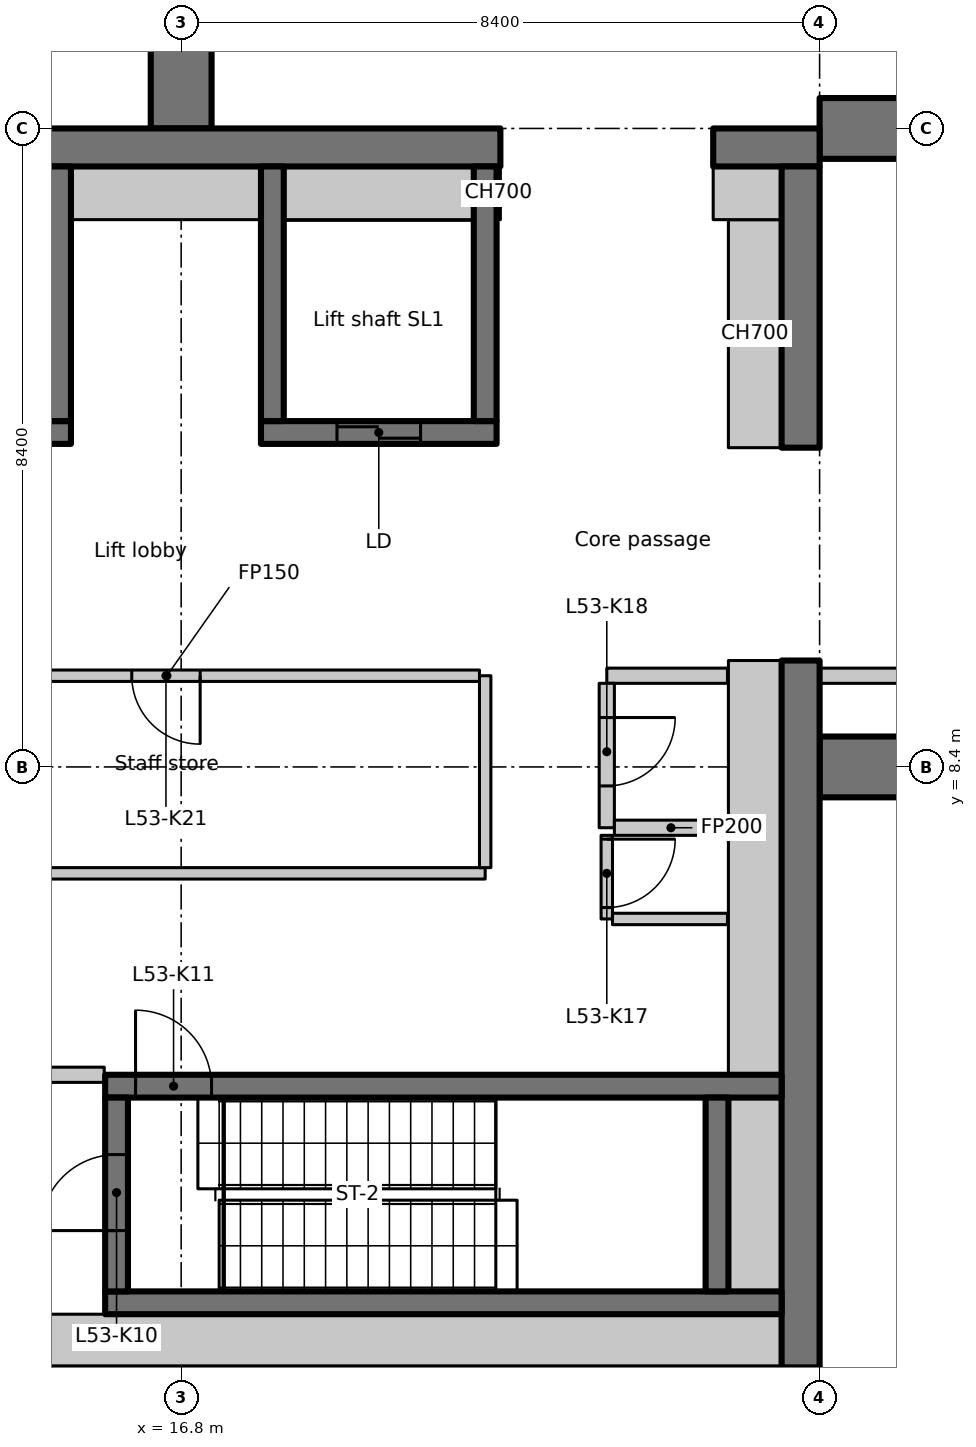
"""IFC4 building model, lengths in metres.
Left out: names, types, materials, properties, quantities, classifications, styles, units other than length and angle.
Written with IfcOpenShell. Run it as: python <this file> out.ifc"""

import sys

from ifc_helpers import new_model, si_unit, direction, frame, frame_2d, origin, place, context, subcontext, project, spatial, rectangle, extrude, element, fill, save


model = new_model("IFC4")
c1 = context("Model", 3, precision=1e-05, world=origin(), true_north=direction((0.0, 1.0)))
c2 = subcontext(c1, "Body", "Model", "MODEL_VIEW")
j1 = project(units=[si_unit("LENGTHUNIT", "METRE"), si_unit("PLANEANGLEUNIT", "RADIAN")], contexts=[c1])
p1 = place(None, origin())
s1 = spatial("IfcSite", under=j1, at=p1, CompositionType="ELEMENT")
p2 = place(p1, origin())
s2 = spatial("IfcBuilding", under=s1, at=p2, CompositionType="ELEMENT")
p3 = place(p2, frame((0.0, 0.0, 210.9)))
s3 = spatial("IfcBuildingStorey", under=s2, at=p3, CompositionType="ELEMENT", Elevation=210.9)
for number, where, z_axis, x_axis in (
    (1, (25.2, 8.4, 0.0), (0.0, 0.0, 1.0), (1.0, 0.0, 0.0)),
    (2, (25.2, 16.8, 0.0), (0.0, 0.0, 1.0), (1.0, 0.0, 0.0)),
    (3, (16.8, 16.8, 0.0), (0.0, 0.0, 1.0), (0.0, 1.0, 0.0)),
):
    element("IfcWall", number, at=place(p3, frame(where, z_axis=z_axis, x_axis=x_axis)), inside=s3, PredefinedType="SHEAR", context=c2, shape_type="SweptSolid", body=[
        extrude(rectangle(XDim=3.115, YDim=0.8, at=frame_2d((1.558, 0.0))), origin(), (0.0, 0.0, 1.0), 4.55),
    ])
p4 = place(p3, frame((-1.1, 16.55, 0.0), z_axis=(0.0, 0.0, 1.0), x_axis=(1.0, 0.0, 0.0)))
e4 = element("IfcWall", 4, at=p4, inside=s3, PredefinedType="SHEAR", context=c2, shape_type="SweptSolid", body=[
    extrude(rectangle(XDim=22.1, YDim=0.5, at=frame_2d((11.05, 0.0))), origin(), (0.0, 0.0, 1.0), 4.55),
])
p5 = place(p4, frame((3.15, 0.0, 0.0)))
e5 = element("IfcOpeningElement", 5, at=p5, cuts=e4, PredefinedType="OPENING", context=c2, shape_type="SweptSolid", body=[
    extrude(rectangle(XDim=1.1, YDim=2.3, at=frame_2d((0.55, 1.15))), frame((0.0, 0.26, 0.0), z_axis=(0.0, -1.0, 0.0), x_axis=(1.0, 0.0, 0.0)), (0.0, 0.0, 1.0), 0.52),
])
p6 = place(p3, frame((23.8, 16.55, 0.0), z_axis=(0.0, 0.0, 1.0), x_axis=(1.0, 0.0, 0.0)))
e6 = element("IfcWall", 6, at=p6, inside=s3, PredefinedType="SHEAR", context=c2, shape_type="SweptSolid", body=[
    extrude(rectangle(XDim=1.4, YDim=0.5, at=frame_2d((0.7, 0.0))), origin(), (0.0, 0.0, 1.0), 4.55),
])
p7 = place(p3, frame((24.95, 0.5, 0.0), z_axis=(0.0, 0.0, 1.0), x_axis=(0.0, 1.0, 0.0)))
e7 = element("IfcWall", 7, at=p7, inside=s3, PredefinedType="SHEAR", context=c2, shape_type="SweptSolid", body=[
    extrude(rectangle(XDim=9.3, YDim=0.5, at=frame_2d((4.65, 0.0))), origin(), (0.0, 0.0, 1.0), 4.55),
])
p8 = place(p3, frame((24.95, 12.6, 0.0), z_axis=(0.0, 0.0, 1.0), x_axis=(0.0, 1.0, 0.0)))
e8 = element("IfcWall", 8, at=p8, inside=s3, PredefinedType="SHEAR", context=c2, shape_type="SweptSolid", body=[
    extrude(rectangle(XDim=3.7, YDim=0.5, at=frame_2d((1.85, 0.0))), origin(), (0.0, 0.0, 1.0), 4.55),
])
p9 = place(p3, frame((24.35, 12.6, 0.0), z_axis=(0.0, 0.0, 1.0), x_axis=(0.0, 1.0, 0.0)))
e9 = element("IfcWall", 9, at=p9, inside=s3, PredefinedType="PARTITIONING", context=c2, shape_type="SweptSolid", body=[
    extrude(rectangle(XDim=3.0, YDim=0.7, at=frame_2d((1.5, 0.0))), origin(), (0.0, 0.0, 1.0), 4.55),
])
p10 = place(p3, frame((23.8, 15.95, 0.0), z_axis=(0.0, 0.0, 1.0), x_axis=(1.0, 0.0, 0.0)))
e10 = element("IfcWall", 10, at=p10, inside=s3, PredefinedType="PARTITIONING", context=c2, shape_type="SweptSolid", body=[
    extrude(rectangle(XDim=0.9, YDim=0.7, at=frame_2d((0.45, 0.0))), origin(), (0.0, 0.0, 1.0), 4.55),
])
p11 = place(p3, frame((0.5, 12.8, 0.0), z_axis=(0.0, 0.0, 1.0), x_axis=(1.0, 0.0, 0.0)))
e11 = element("IfcWall", 11, at=p11, inside=s3, PredefinedType="SHEAR", context=c2, shape_type="SweptSolid", body=[
    extrude(rectangle(XDim=14.85, YDim=0.3, at=frame_2d((7.425, 0.0))), origin(), (0.0, 0.0, 1.0), 4.55),
])
p12 = place(p11, frame((4.35, 0.0, 0.0)))
e12 = element("IfcOpeningElement", 12, at=p12, cuts=e11, PredefinedType="OPENING", context=c2, shape_type="SweptSolid", body=[
    extrude(rectangle(XDim=1.1, YDim=2.3, at=frame_2d((0.55, 1.15))), frame((0.0, 0.16, 0.0), z_axis=(0.0, -1.0, 0.0), x_axis=(1.0, 0.0, 0.0)), (0.0, 0.0, 1.0), 0.32),
])
p13 = place(p11, frame((7.15, 0.0, 0.0)))
e13 = element("IfcOpeningElement", 13, at=p13, cuts=e11, PredefinedType="OPENING", context=c2, shape_type="SweptSolid", body=[
    extrude(rectangle(XDim=1.1, YDim=2.3, at=frame_2d((0.55, 1.15))), frame((0.0, 0.16, 0.0), z_axis=(0.0, -1.0, 0.0), x_axis=(1.0, 0.0, 0.0)), (0.0, 0.0, 1.0), 0.32),
])
p14 = place(p11, frame((9.95, 0.0, 0.0)))
e14 = element("IfcOpeningElement", 14, at=p14, cuts=e11, PredefinedType="OPENING", context=c2, shape_type="SweptSolid", body=[
    extrude(rectangle(XDim=1.1, YDim=2.3, at=frame_2d((0.55, 1.15))), frame((0.0, 0.16, 0.0), z_axis=(0.0, -1.0, 0.0), x_axis=(1.0, 0.0, 0.0)), (0.0, 0.0, 1.0), 0.32),
])
p15 = place(p11, frame((12.75, 0.0, 0.0)))
e15 = element("IfcOpeningElement", 15, at=p15, cuts=e11, PredefinedType="OPENING", context=c2, shape_type="SweptSolid", body=[
    extrude(rectangle(XDim=1.1, YDim=2.3, at=frame_2d((0.55, 1.15))), frame((0.0, 0.16, 0.0), z_axis=(0.0, -1.0, 0.0), x_axis=(1.0, 0.0, 0.0)), (0.0, 0.0, 1.0), 0.32),
])
p16 = place(p3, frame((15.2, 12.95, 0.0), z_axis=(0.0, 0.0, 1.0), x_axis=(0.0, 1.0, 0.0)))
e16 = element("IfcWall", 16, at=p16, inside=s3, PredefinedType="SHEAR", context=c2, shape_type="SweptSolid", body=[
    extrude(rectangle(XDim=3.35, YDim=0.3, at=frame_2d((1.675, 0.0))), origin(), (0.0, 0.0, 1.0), 4.55),
])
p17 = place(p3, frame((17.85, 12.8, 0.0), z_axis=(0.0, 0.0, 1.0), x_axis=(1.0, 0.0, 0.0)))
e17 = element("IfcWall", 17, at=p17, inside=s3, PredefinedType="SHEAR", context=c2, shape_type="SweptSolid", body=[
    extrude(rectangle(XDim=3.1, YDim=0.3, at=frame_2d((1.55, 0.0))), origin(), (0.0, 0.0, 1.0), 4.55),
])
p18 = place(p17, frame((1.0, 0.0, 0.0)))
e18 = element("IfcOpeningElement", 18, at=p18, cuts=e17, PredefinedType="OPENING", context=c2, shape_type="SweptSolid", body=[
    extrude(rectangle(XDim=1.1, YDim=2.3, at=frame_2d((0.55, 1.15))), frame((0.0, 0.16, 0.0), z_axis=(0.0, -1.0, 0.0), x_axis=(1.0, 0.0, 0.0)), (0.0, 0.0, 1.0), 0.32),
])
for number, where, z_axis, x_axis in (
    (19, (18.0, 12.95, 0.0), (0.0, 0.0, 1.0), (0.0, 1.0, 0.0)),
    (20, (20.8, 12.95, 0.0), (0.0, 0.0, 1.0), (0.0, 1.0, 0.0)),
):
    element("IfcWall", number, at=place(p3, frame(where, z_axis=z_axis, x_axis=x_axis)), inside=s3, PredefinedType="SHEAR", context=c2, shape_type="SweptSolid", body=[
        extrude(rectangle(XDim=3.35, YDim=0.3, at=frame_2d((1.675, 0.0))), origin(), (0.0, 0.0, 1.0), 4.55),
    ])
p19 = place(p3, frame((15.8, 1.35, 0.0), z_axis=(0.0, 0.0, 1.0), x_axis=(1.0, 0.0, 0.0)))
e21 = element("IfcWall", 21, at=p19, inside=s3, PredefinedType="SHEAR", context=c2, shape_type="SweptSolid", body=[
    extrude(rectangle(XDim=8.9, YDim=0.3, at=frame_2d((4.45, 0.0))), origin(), (0.0, 0.0, 1.0), 4.55),
])
p20 = place(p3, frame((15.8, 4.2, 0.0), z_axis=(0.0, 0.0, 1.0), x_axis=(1.0, 0.0, 0.0)))
e22 = element("IfcWall", 22, at=p20, inside=s3, PredefinedType="SHEAR", context=c2, shape_type="SweptSolid", body=[
    extrude(rectangle(XDim=8.9, YDim=0.3, at=frame_2d((4.45, 0.0))), origin(), (0.0, 0.0, 1.0), 4.55),
])
p21 = place(p20, frame((0.4, 0.0, 0.0)))
e23 = element("IfcOpeningElement", 23, at=p21, cuts=e22, PredefinedType="OPENING", context=c2, shape_type="SweptSolid", body=[
    extrude(rectangle(XDim=1.0, YDim=2.1, at=frame_2d((0.5, 1.05))), frame((0.0, 0.16, 0.0), z_axis=(0.0, -1.0, 0.0), x_axis=(1.0, 0.0, 0.0)), (0.0, 0.0, 1.0), 0.32),
])
p22 = place(p3, frame((15.95, 1.5, 0.0), z_axis=(0.0, 0.0, 1.0), x_axis=(0.0, 1.0, 0.0)))
e24 = element("IfcWall", 24, at=p22, inside=s3, PredefinedType="SHEAR", context=c2, shape_type="SweptSolid", body=[
    extrude(rectangle(XDim=2.55, YDim=0.3, at=frame_2d((1.275, 0.0))), origin(), (0.0, 0.0, 1.0), 4.55),
])
p23 = place(p22, frame((0.8, 0.0, 0.0)))
e25 = element("IfcOpeningElement", 25, at=p23, cuts=e24, PredefinedType="OPENING", context=c2, shape_type="SweptSolid", body=[
    extrude(rectangle(XDim=1.0, YDim=2.1, at=frame_2d((0.5, 1.05))), frame((0.0, 0.16, 0.0), z_axis=(0.0, -1.0, 0.0), x_axis=(1.0, 0.0, 0.0)), (0.0, 0.0, 1.0), 0.32),
])
p24 = place(p3, frame((23.85, 1.5, 0.0), z_axis=(0.0, 0.0, 1.0), x_axis=(0.0, 1.0, 0.0)))
e26 = element("IfcWall", 26, at=p24, inside=s3, PredefinedType="SHEAR", context=c2, shape_type="SweptSolid", body=[
    extrude(rectangle(XDim=2.55, YDim=0.3, at=frame_2d((1.275, 0.0))), origin(), (0.0, 0.0, 1.0), 4.55),
])
p25 = place(p3, frame((13.362, 4.35, 0.0), z_axis=(0.0, 0.0, 1.0), x_axis=(1.0, 0.0, 0.0)))
e27 = element("IfcWall", 27, at=p25, inside=s3, PredefinedType="PARTITIONING", context=c2, shape_type="SweptSolid", body=[
    extrude(rectangle(XDim=2.426, YDim=0.2, at=frame_2d((1.213, 0.0))), origin(), (0.0, 0.0, 1.0), 4.55),
])
p26 = place(p25, frame((0.638, 0.0, 0.0)))
e28 = element("IfcOpeningElement", 28, at=p26, cuts=e27, PredefinedType="OPENING", context=c2, shape_type="SweptSolid", body=[
    extrude(rectangle(XDim=1.0, YDim=2.1, at=frame_2d((0.5, 1.05))), frame((0.0, 0.11, 0.0), z_axis=(0.0, -1.0, 0.0), x_axis=(1.0, 0.0, 0.0)), (0.0, 0.0, 1.0), 0.22),
])
p27 = place(p3, frame((23.988, 9.6, 0.0), z_axis=(0.0, 0.0, 1.0), x_axis=(-1.0, 0.0, 0.0)))
e29 = element("IfcWall", 29, at=p27, inside=s3, PredefinedType="PARTITIONING", context=c2, shape_type="SweptSolid", body=[
    extrude(rectangle(XDim=1.588, YDim=0.2, at=frame_2d((0.794, 0.0))), origin(), (0.0, 0.0, 1.0), 4.55),
])
p28 = place(p3, frame((22.4, 9.5, 0.0), z_axis=(0.0, 0.0, 1.0), x_axis=(0.0, -1.0, 0.0)))
e30 = element("IfcWall", 30, at=p28, inside=s3, PredefinedType="PARTITIONING", context=c2, shape_type="SweptSolid", body=[
    extrude(rectangle(XDim=1.9, YDim=0.2, at=frame_2d((0.95, 0.0))), origin(), (0.0, 0.0, 1.0), 4.55),
])
p29 = place(p28, frame((0.45, 0.0, 0.0)))
e31 = element("IfcOpeningElement", 31, at=p29, cuts=e30, PredefinedType="OPENING", context=c2, shape_type="SweptSolid", body=[
    extrude(rectangle(XDim=0.9, YDim=2.1, at=frame_2d((0.45, 1.05))), frame((0.0, 0.11, 0.0), z_axis=(0.0, -1.0, 0.0), x_axis=(1.0, 0.0, 0.0)), (0.0, 0.0, 1.0), 0.22),
])
p30 = place(p3, frame((22.5, 7.6, 0.0), z_axis=(0.0, 0.0, 1.0), x_axis=(1.0, 0.0, 0.0)))
e32 = element("IfcWall", 32, at=p30, inside=s3, PredefinedType="PARTITIONING", context=c2, shape_type="SweptSolid", body=[
    extrude(rectangle(XDim=1.488, YDim=0.2, at=frame_2d((0.744, 0.0))), origin(), (0.0, 0.0, 1.0), 4.55),
])
p31 = place(p3, frame((12.5, 7.0, 0.0), z_axis=(0.0, 0.0, 1.0), x_axis=(1.0, 0.0, 0.0)))
e33 = element("IfcWall", 33, at=p31, inside=s3, PredefinedType="PARTITIONING", context=c2, shape_type="SweptSolid", body=[
    extrude(rectangle(XDim=8.3, YDim=0.15, at=frame_2d((4.15, 0.0))), origin(), (0.0, 0.0, 1.0), 4.55),
])
p32 = place(p3, frame((20.8, 7.075, 0.0), z_axis=(0.0, 0.0, 1.0), x_axis=(0.0, 1.0, 0.0)))
e34 = element("IfcWall", 34, at=p32, inside=s3, PredefinedType="PARTITIONING", context=c2, shape_type="SweptSolid", body=[
    extrude(rectangle(XDim=2.525, YDim=0.15, at=frame_2d((1.263, 0.0))), origin(), (0.0, 0.0, 1.0), 4.55),
])
p33 = place(p3, frame((20.725, 9.6, 0.0), z_axis=(0.0, 0.0, 1.0), x_axis=(-1.0, 0.0, 0.0)))
e35 = element("IfcWall", 35, at=p33, inside=s3, PredefinedType="PARTITIONING", context=c2, shape_type="SweptSolid", body=[
    extrude(rectangle(XDim=8.225, YDim=0.15, at=frame_2d((4.113, 0.0))), origin(), (0.0, 0.0, 1.0), 4.55),
])
p34 = place(p33, frame((3.675, 0.0, 0.0)))
e36 = element("IfcOpeningElement", 36, at=p34, cuts=e35, PredefinedType="OPENING", context=c2, shape_type="SweptSolid", body=[
    extrude(rectangle(XDim=0.9, YDim=2.1, at=frame_2d((0.45, 1.05))), frame((0.0, 0.085, 0.0), z_axis=(0.0, -1.0, 0.0), x_axis=(1.0, 0.0, 0.0)), (0.0, 0.0, 1.0), 0.17),
])
p35 = place(p3, frame((22.4, 7.5, 0.0), z_axis=(0.0, 0.0, 1.0), x_axis=(0.0, -1.0, 0.0)))
e37 = element("IfcWall", 37, at=p35, inside=s3, PredefinedType="PARTITIONING", context=c2, shape_type="SweptSolid", body=[
    extrude(rectangle(XDim=1.1, YDim=0.15, at=frame_2d((0.55, 0.0))), origin(), (0.0, 0.0, 1.0), 4.55),
])
p36 = place(p35, frame((0.05, 0.0, 0.0)))
e38 = element("IfcOpeningElement", 38, at=p36, cuts=e37, PredefinedType="OPENING", context=c2, shape_type="SweptSolid", body=[
    extrude(rectangle(XDim=0.9, YDim=2.1, at=frame_2d((0.45, 1.05))), frame((0.0, 0.085, 0.0), z_axis=(0.0, -1.0, 0.0), x_axis=(1.0, 0.0, 0.0)), (0.0, 0.0, 1.0), 0.17),
])
p37 = place(p3, frame((22.475, 6.4, 0.0), z_axis=(0.0, 0.0, 1.0), x_axis=(1.0, 0.0, 0.0)))
e39 = element("IfcWall", 39, at=p37, inside=s3, PredefinedType="PARTITIONING", context=c2, shape_type="SweptSolid", body=[
    extrude(rectangle(XDim=1.513, YDim=0.15, at=frame_2d((0.756, 0.0))), origin(), (0.0, 0.0, 1.0), 4.55),
])
for number, where, z_axis, x_axis in (
    (40, (15.35, 15.95, 0.0), (0.0, 0.0, 1.0), (1.0, 0.0, 0.0)),
    (41, (18.15, 15.95, 0.0), (0.0, 0.0, 1.0), (1.0, 0.0, 0.0)),
):
    element("IfcWall", number, at=place(p3, frame(where, z_axis=z_axis, x_axis=x_axis)), inside=s3, PredefinedType="PARTITIONING", context=c2, shape_type="SweptSolid", body=[
        extrude(rectangle(XDim=2.5, YDim=0.7, at=frame_2d((1.25, 0.0))), origin(), (0.0, 0.0, 1.0), 4.55),
    ])
p38 = place(p3, frame((20.95, 15.95, 0.0), z_axis=(0.0, 0.0, 1.0), x_axis=(1.0, 0.0, 0.0)))
e42 = element("IfcWall", 42, at=p38, inside=s3, PredefinedType="PARTITIONING", context=c2, shape_type="SweptSolid", body=[
    extrude(rectangle(XDim=0.05, YDim=0.7, at=frame_2d((0.025, 0.0))), origin(), (0.0, 0.0, 1.0), 4.55),
])
p39 = place(p3, frame((13.35, 0.85, 0.0), z_axis=(0.0, 0.0, 1.0), x_axis=(1.0, 0.0, 0.0)))
e43 = element("IfcWall", 43, at=p39, inside=s3, PredefinedType="PARTITIONING", context=c2, shape_type="SweptSolid", body=[
    extrude(rectangle(XDim=11.35, YDim=0.7, at=frame_2d((5.675, 0.0))), origin(), (0.0, 0.0, 1.0), 4.55),
])
p40 = place(p3, frame((24.35, 1.5, 0.0), z_axis=(0.0, 0.0, 1.0), x_axis=(0.0, 1.0, 0.0)))
e44 = element("IfcWall", 44, at=p40, inside=s3, PredefinedType="PARTITIONING", context=c2, shape_type="SweptSolid", body=[
    extrude(rectangle(XDim=2.55, YDim=0.7, at=frame_2d((1.275, 0.0))), origin(), (0.0, 0.0, 1.0), 4.55),
])
p41 = place(p3, frame((24.35, 4.35, 0.0), z_axis=(0.0, 0.0, 1.0), x_axis=(0.0, 1.0, 0.0)))
e45 = element("IfcWall", 45, at=p41, inside=s3, PredefinedType="PARTITIONING", context=c2, shape_type="SweptSolid", body=[
    extrude(rectangle(XDim=5.45, YDim=0.7, at=frame_2d((2.725, 0.0))), origin(), (0.0, 0.0, 1.0), 4.55),
])
p42 = place(p3, frame((29.4, 9.6, 0.0), z_axis=(0.0, 0.0, 1.0), x_axis=(-1.0, 0.0, 0.0)))
e46 = element("IfcWall", 46, at=p42, inside=s3, PredefinedType="PARTITIONING", context=c2, shape_type="SweptSolid", body=[
    extrude(rectangle(XDim=4.2, YDim=0.2, at=frame_2d((2.1, 0.0))), origin(), (0.0, 0.0, 1.0), 4.53),
])
p43 = place(p18, origin())
e47 = element("IfcDoor", 47, at=p43, inside=s3, OperationType="SLIDING_TO_LEFT", PredefinedType="DOOR", context=c2, shape_type="SweptSolid", body=[
    extrude(rectangle(XDim=1.1, YDim=2.3, at=frame_2d((0.55, 1.15))), frame((0.0, 0.025, 0.0), z_axis=(0.0, -1.0, 0.0), x_axis=(1.0, 0.0, 0.0)), (0.0, 0.0, 1.0), 0.05),
])
fill(e18, e47)
p44 = place(p23, origin())
e48 = element("IfcDoor", 48, at=p44, inside=s3, OperationType="SINGLE_SWING_RIGHT", PredefinedType="DOOR", context=c2, shape_type="SweptSolid", body=[
    extrude(rectangle(XDim=1.0, YDim=2.1, at=frame_2d((0.5, 1.05))), frame((0.0, 0.025, 0.0), z_axis=(0.0, -1.0, 0.0), x_axis=(1.0, 0.0, 0.0)), (0.0, 0.0, 1.0), 0.05),
])
fill(e25, e48)
p45 = place(p21, origin())
e49 = element("IfcDoor", 49, at=p45, inside=s3, OperationType="SINGLE_SWING_LEFT", PredefinedType="DOOR", context=c2, shape_type="SweptSolid", body=[
    extrude(rectangle(XDim=1.0, YDim=2.1, at=frame_2d((0.5, 1.05))), frame((0.0, 0.025, 0.0), z_axis=(0.0, -1.0, 0.0), x_axis=(1.0, 0.0, 0.0)), (0.0, 0.0, 1.0), 0.05),
])
fill(e23, e49)
p46 = place(p36, origin())
e50 = element("IfcDoor", 50, at=p46, inside=s3, OperationType="SINGLE_SWING_LEFT", PredefinedType="DOOR", context=c2, shape_type="SweptSolid", body=[
    extrude(rectangle(XDim=0.9, YDim=2.1, at=frame_2d((0.45, 1.05))), frame((0.0, 0.025, 0.0), z_axis=(0.0, -1.0, 0.0), x_axis=(1.0, 0.0, 0.0)), (0.0, 0.0, 1.0), 0.05),
])
fill(e38, e50)
p47 = place(p29, origin())
e51 = element("IfcDoor", 51, at=p47, inside=s3, OperationType="SINGLE_SWING_RIGHT", PredefinedType="DOOR", context=c2, shape_type="SweptSolid", body=[
    extrude(rectangle(XDim=0.9, YDim=2.1, at=frame_2d((0.45, 1.05))), frame((0.0, 0.025, 0.0), z_axis=(0.0, -1.0, 0.0), x_axis=(1.0, 0.0, 0.0)), (0.0, 0.0, 1.0), 0.05),
])
fill(e31, e51)
p48 = place(p34, origin())
e52 = element("IfcDoor", 52, at=p48, inside=s3, OperationType="SINGLE_SWING_LEFT", PredefinedType="DOOR", context=c2, shape_type="SweptSolid", body=[
    extrude(rectangle(XDim=0.9, YDim=2.1, at=frame_2d((0.45, 1.05))), frame((0.0, 0.025, 0.0), z_axis=(0.0, -1.0, 0.0), x_axis=(1.0, 0.0, 0.0)), (0.0, 0.0, 1.0), 0.05),
])
fill(e36, e52)
save(model, sys.argv[1])
